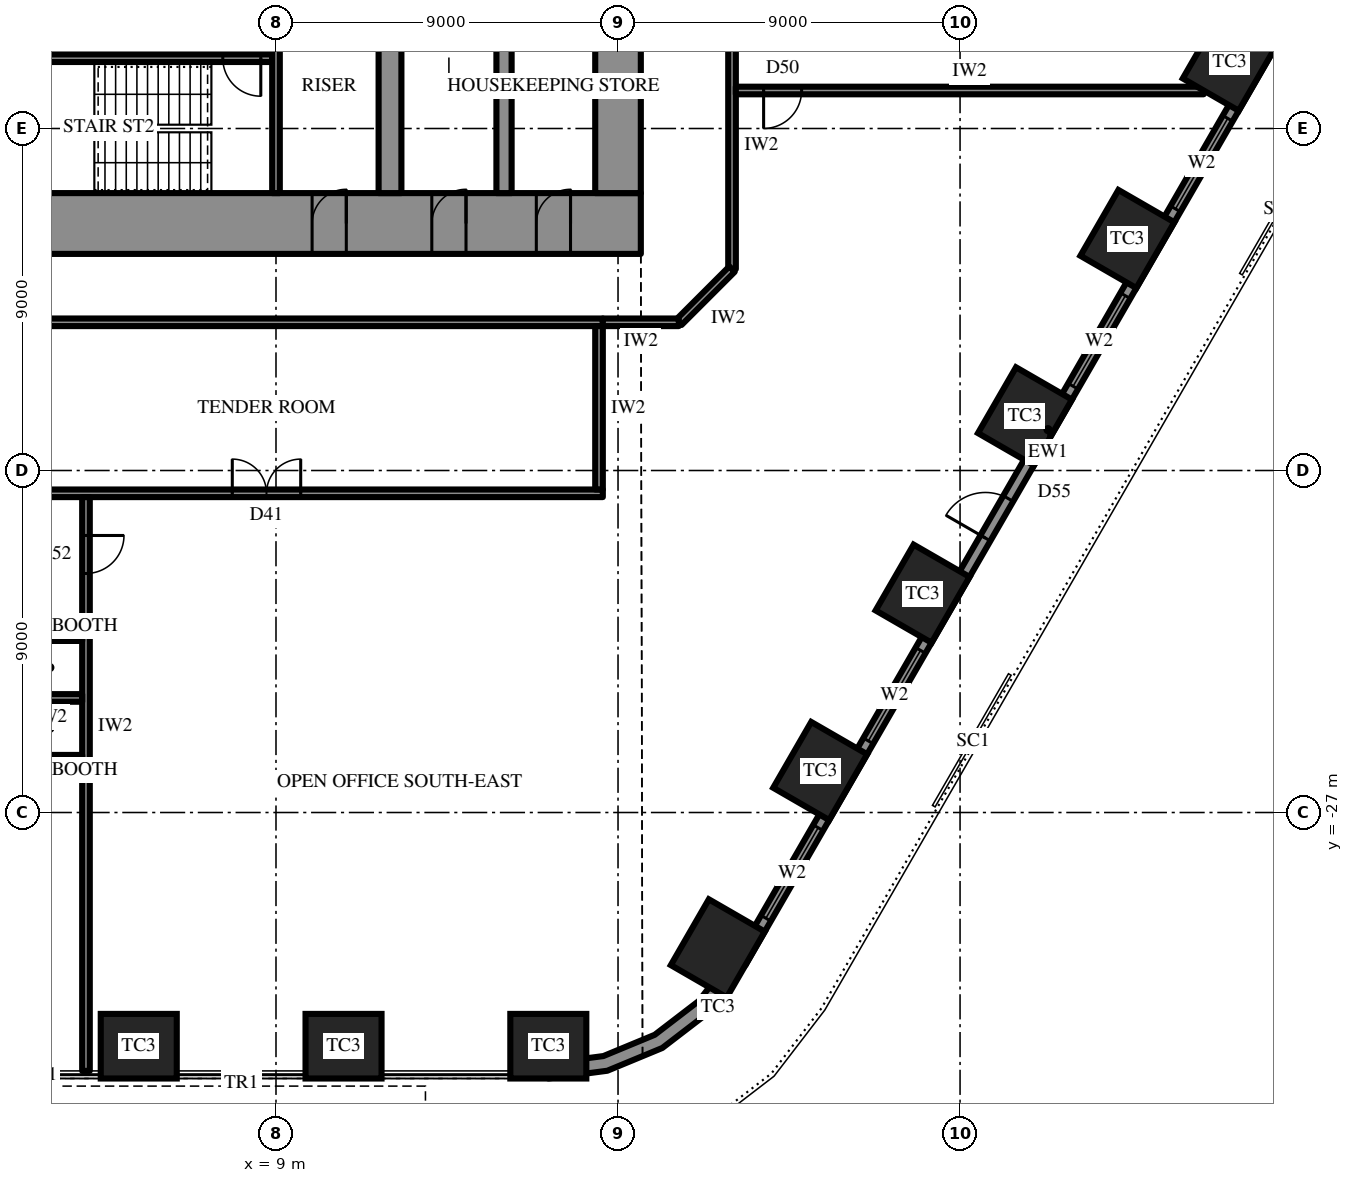
"""IFC4 building model, lengths in metres.
Left out: names, types, materials, properties, quantities, classifications, styles, units other than length and angle.
Written with IfcOpenShell. Run it as: python <this file> out.ifc"""

import sys

from ifc_helpers import new_model, si_unit, direction, frame, frame_2d, origin, origin_2d, place, context, subcontext, project, spatial, polyline, rectangle, outline, extrude, element, fill, save


model = new_model("IFC4")
c1 = context("Model", 3, precision=1e-05, world=origin(), true_north=direction((0.0, 1.0)))
c2 = subcontext(c1, "Body", "Model", "MODEL_VIEW")
j1 = project(units=[si_unit("LENGTHUNIT", "METRE"), si_unit("PLANEANGLEUNIT", "RADIAN")], contexts=[c1])
p1 = place(None, origin())
s1 = spatial("IfcSite", under=j1, at=p1, CompositionType="ELEMENT")
p2 = place(p1, origin())
s2 = spatial("IfcBuilding", under=s1, at=p2, CompositionType="ELEMENT")
p3 = place(p2, frame((0.0, 0.0, 65.5)))
s3 = spatial("IfcBuildingStorey", under=s2, at=p3, CompositionType="ELEMENT", Elevation=65.5)
for number, where, z_axis, x_axis in (
    (1, (5.389, -33.15, 0.0), (0.0, 0.0, 1.0), (1.0, 0.0, 0.0)),
    (2, (10.777, -33.15, 0.0), (0.0, 0.0, 1.0), (1.0, 0.0, 0.0)),
    (3, (16.166, -33.15, 0.0), (0.0, 0.0, 1.0), (1.0, 0.0, 0.0)),
    (4, (20.626, -30.575, 0.0), (0.0, 0.0, 1.0), (0.5, 0.866, 0.0)),
    (5, (23.32, -25.908, 0.0), (0.0, 0.0, 1.0), (0.5, 0.866, 0.0)),
    (6, (26.014, -21.242, 0.0), (0.0, 0.0, 1.0), (0.5, 0.866, 0.0)),
    (7, (28.709, -16.575, 0.0), (0.0, 0.0, 1.0), (0.5, 0.866, 0.0)),
    (8, (31.403, -11.908, 0.0), (0.0, 0.0, 1.0), (0.5, 0.866, 0.0)),
    (9, (34.097, -7.242, 0.0), (0.0, 0.0, 1.0), (0.5, 0.866, 0.0)),
):
    element("IfcColumn", number, at=place(p3, frame(where, z_axis=z_axis, x_axis=x_axis)), inside=s3, PredefinedType="COLUMN", context=c2, shape_type="SweptSolid", body=[
        extrude(rectangle(XDim=2.0, YDim=1.7, at=origin_2d()), origin(), (0.0, 0.0, 1.0), 4.2),
    ])
p4 = place(p3, frame((18.6, -11.5, 0.0), z_axis=(0.0, 0.0, 1.0), x_axis=(-1.0, 0.0, 0.0)))
e10 = element("IfcWall", 10, at=p4, inside=s3, PredefinedType="SHEAR", context=c2, shape_type="SweptSolid", body=[
    extrude(rectangle(XDim=37.2, YDim=1.6, at=frame_2d((18.6, 0.0))), origin(), (0.0, 0.0, 1.0), 4.2),
])
p5 = place(p4, frame((19.45, 0.0, 0.0)))
e11 = element("IfcOpeningElement", 11, at=p5, cuts=e10, PredefinedType="OPENING", context=c2, shape_type="SweptSolid", body=[
    extrude(rectangle(XDim=0.9, YDim=2.2, at=frame_2d((0.45, 1.1))), frame((0.0, 0.81, 0.0), z_axis=(0.0, -1.0, 0.0), x_axis=(1.0, 0.0, 0.0)), (0.0, 0.0, 1.0), 1.62),
])
p6 = place(p4, frame((22.45, 0.0, 0.0)))
e12 = element("IfcOpeningElement", 12, at=p6, cuts=e10, PredefinedType="OPENING", context=c2, shape_type="SweptSolid", body=[
    extrude(rectangle(XDim=0.9, YDim=2.2, at=frame_2d((0.45, 1.1))), frame((0.0, 0.81, 0.0), z_axis=(0.0, -1.0, 0.0), x_axis=(1.0, 0.0, 0.0)), (0.0, 0.0, 1.0), 1.62),
])
p7 = place(p4, frame((25.5, 0.0, 0.0)))
e13 = element("IfcOpeningElement", 13, at=p7, cuts=e10, PredefinedType="OPENING", context=c2, shape_type="SweptSolid", body=[
    extrude(rectangle(XDim=1.0, YDim=2.2, at=frame_2d((0.5, 1.1))), frame((0.0, 0.81, 0.0), z_axis=(0.0, -1.0, 0.0), x_axis=(1.0, 0.0, 0.0)), (0.0, 0.0, 1.0), 1.62),
])
p8 = place(p4, frame((1.85, 0.0, 0.0)))
e14 = element("IfcOpeningElement", 14, at=p8, cuts=e10, PredefinedType="OPENING", context=c2, shape_type="SweptSolid", body=[
    extrude(rectangle(XDim=0.9, YDim=2.2, at=frame_2d((0.45, 1.1))), frame((0.0, 0.81, 0.0), z_axis=(0.0, -1.0, 0.0), x_axis=(1.0, 0.0, 0.0)), (0.0, 0.0, 1.0), 1.62),
])
p9 = place(p4, frame((4.6, 0.0, 0.0)))
e15 = element("IfcOpeningElement", 15, at=p9, cuts=e10, PredefinedType="OPENING", context=c2, shape_type="SweptSolid", body=[
    extrude(rectangle(XDim=0.9, YDim=2.2, at=frame_2d((0.45, 1.1))), frame((0.0, 0.81, 0.0), z_axis=(0.0, -1.0, 0.0), x_axis=(1.0, 0.0, 0.0)), (0.0, 0.0, 1.0), 1.62),
])
p10 = place(p4, frame((7.75, 0.0, 0.0)))
e16 = element("IfcOpeningElement", 16, at=p10, cuts=e10, PredefinedType="OPENING", context=c2, shape_type="SweptSolid", body=[
    extrude(rectangle(XDim=0.9, YDim=2.2, at=frame_2d((0.45, 1.1))), frame((0.0, 0.81, 0.0), z_axis=(0.0, -1.0, 0.0), x_axis=(1.0, 0.0, 0.0)), (0.0, 0.0, 1.0), 1.62),
])
p11 = place(p4, frame((28.55, 0.0, 0.0)))
e17 = element("IfcOpeningElement", 17, at=p11, cuts=e10, PredefinedType="OPENING", context=c2, shape_type="SweptSolid", body=[
    extrude(rectangle(XDim=0.9, YDim=2.2, at=frame_2d((0.45, 1.1))), frame((0.0, 0.81, 0.0), z_axis=(0.0, -1.0, 0.0), x_axis=(1.0, 0.0, 0.0)), (0.0, 0.0, 1.0), 1.62),
])
p12 = place(p4, frame((31.7, 0.0, 0.0)))
e18 = element("IfcOpeningElement", 18, at=p12, cuts=e10, PredefinedType="OPENING", context=c2, shape_type="SweptSolid", body=[
    extrude(rectangle(XDim=0.9, YDim=2.2, at=frame_2d((0.45, 1.1))), frame((0.0, 0.81, 0.0), z_axis=(0.0, -1.0, 0.0), x_axis=(1.0, 0.0, 0.0)), (0.0, 0.0, 1.0), 1.62),
])
p13 = place(p4, frame((34.45, 0.0, 0.0)))
e19 = element("IfcOpeningElement", 19, at=p13, cuts=e10, PredefinedType="OPENING", context=c2, shape_type="SweptSolid", body=[
    extrude(rectangle(XDim=0.9, YDim=2.2, at=frame_2d((0.45, 1.1))), frame((0.0, 0.81, 0.0), z_axis=(0.0, -1.0, 0.0), x_axis=(1.0, 0.0, 0.0)), (0.0, 0.0, 1.0), 1.62),
])
p14 = place(p3, frame((18.0, -10.7, 0.0), z_axis=(0.0, 0.0, 1.0), x_axis=(0.0, 1.0, 0.0)))
e20 = element("IfcWall", 20, at=p14, inside=s3, PredefinedType="SHEAR", context=c2, shape_type="SweptSolid", body=[
    extrude(rectangle(XDim=21.4, YDim=1.2, at=frame_2d((10.7, 0.0))), origin(), (0.0, 0.0, 1.0), 4.2),
])
p15 = place(p14, frame((9.8, 0.0, 0.0)))
e21 = element("IfcOpeningElement", 21, at=p15, cuts=e20, PredefinedType="OPENING", context=c2, shape_type="SweptSolid", body=[
    extrude(rectangle(XDim=1.8, YDim=2.4, at=frame_2d((0.9, 1.2))), frame((0.0, 0.61, 0.0), z_axis=(0.0, -1.0, 0.0), x_axis=(1.0, 0.0, 0.0)), (0.0, 0.0, 1.0), 1.22),
])
p16 = place(p3, frame((12.0, -10.7, 0.0), z_axis=(0.0, 0.0, 1.0), x_axis=(0.0, 1.0, 0.0)))
e22 = element("IfcWall", 22, at=p16, inside=s3, PredefinedType="SHEAR", context=c2, shape_type="SweptSolid", body=[
    extrude(rectangle(XDim=21.4, YDim=0.6, at=frame_2d((10.7, 0.0))), origin(), (0.0, 0.0, 1.0), 4.2),
])
p17 = place(p16, frame((9.8, 0.0, 0.0)))
e23 = element("IfcOpeningElement", 23, at=p17, cuts=e22, PredefinedType="OPENING", context=c2, shape_type="SweptSolid", body=[
    extrude(rectangle(XDim=1.8, YDim=2.4, at=frame_2d((0.9, 1.2))), frame((0.0, 0.31, 0.0), z_axis=(0.0, -1.0, 0.0), x_axis=(1.0, 0.0, 0.0)), (0.0, 0.0, 1.0), 0.62),
])
p18 = place(p3, frame((15.0, -10.7, 0.0), z_axis=(0.0, 0.0, 1.0), x_axis=(0.0, 1.0, 0.0)))
e24 = element("IfcWall", 24, at=p18, inside=s3, PredefinedType="SHEAR", context=c2, shape_type="SweptSolid", body=[
    extrude(rectangle(XDim=21.4, YDim=0.4, at=frame_2d((10.7, 0.0))), origin(), (0.0, 0.0, 1.0), 4.2),
])
p19 = place(p18, frame((9.8, 0.0, 0.0)))
e25 = element("IfcOpeningElement", 25, at=p19, cuts=e24, PredefinedType="OPENING", context=c2, shape_type="SweptSolid", body=[
    extrude(rectangle(XDim=1.8, YDim=2.4, at=frame_2d((0.9, 1.2))), frame((0.0, 0.21, 0.0), z_axis=(0.0, -1.0, 0.0), x_axis=(1.0, 0.0, 0.0)), (0.0, 0.0, 1.0), 0.42),
])
p20 = place(p3, frame((8.9, -7.15, 0.0), z_axis=(0.0, 0.0, 1.0), x_axis=(-1.0, 0.0, 0.0)))
e26 = element("IfcWall", 26, at=p20, inside=s3, PredefinedType="SHEAR", context=c2, shape_type="SweptSolid", body=[
    extrude(rectangle(XDim=8.6, YDim=0.2, at=frame_2d((4.3, 0.0))), origin(), (0.0, 0.0, 1.0), 4.2),
])
p21 = place(p20, frame((0.3, 0.0, 0.0)))
e27 = element("IfcOpeningElement", 27, at=p21, cuts=e26, PredefinedType="OPENING", context=c2, shape_type="SweptSolid", body=[
    extrude(rectangle(XDim=1.0, YDim=2.2, at=frame_2d((0.5, 1.1))), frame((0.0, 0.11, 0.0), z_axis=(0.0, -1.0, 0.0), x_axis=(1.0, 0.0, 0.0)), (0.0, 0.0, 1.0), 0.22),
])
p22 = place(p3, origin())
e28 = element("IfcWall", 28, at=p22, inside=s3, PredefinedType="SOLIDWALL", context=c2, shape_type="SweptSolid", body=[
    extrude(outline(polyline([(16.166, -34.0), (17.719, -33.796), (19.166, -33.196), (20.408, -32.243), (21.362, -31.0), (21.016, -30.8), (20.125, -31.96), (18.966, -32.85), (17.615, -33.409), (16.166, -33.6), (16.166, -34.0)])), origin(), (0.0, 0.0, 1.0), 2.7),
])
p23 = place(p3, frame((21.232, -30.925, 0.0), z_axis=(0.0, 0.0, 1.0), x_axis=(0.499999163675, 0.866025886636, 0.0)))
e29 = element("IfcWall", 29, at=p23, inside=s3, PredefinedType="SOLIDWALL", context=c2, shape_type="SweptSolid", body=[
    extrude(rectangle(XDim=32.332, YDim=0.3, at=frame_2d((16.166, 0.0))), origin(), (0.0, 0.0, 1.0), 2.7),
])
p24 = place(p23, frame((1.319, 0.0, 0.6)))
e30 = element("IfcOpeningElement", 30, at=p24, cuts=e29, PredefinedType="OPENING", context=c2, shape_type="SweptSolid", body=[
    extrude(rectangle(XDim=2.75, YDim=1.85, at=frame_2d((1.375, 0.925))), frame((0.0, 0.16, 0.0), z_axis=(0.0, -1.0, 0.0), x_axis=(1.0, 0.0, 0.0)), (0.0, 0.0, 1.0), 0.32),
])
p25 = place(p23, frame((6.708, 0.0, 0.6)))
e31 = element("IfcOpeningElement", 31, at=p25, cuts=e29, PredefinedType="OPENING", context=c2, shape_type="SweptSolid", body=[
    extrude(rectangle(XDim=2.75, YDim=1.85, at=frame_2d((1.375, 0.925))), frame((0.0, 0.16, 0.0), z_axis=(0.0, -1.0, 0.0), x_axis=(1.0, 0.0, 0.0)), (0.0, 0.0, 1.0), 0.32),
])
p26 = place(p23, frame((12.872, 0.0, 0.0)))
e32 = element("IfcOpeningElement", 32, at=p26, cuts=e29, PredefinedType="OPENING", context=c2, shape_type="SweptSolid", body=[
    extrude(rectangle(XDim=1.2, YDim=2.4, at=frame_2d((0.6, 1.2))), frame((0.0, 0.16, 0.0), z_axis=(0.0, -1.0, 0.0), x_axis=(1.0, 0.0, 0.0)), (0.0, 0.0, 1.0), 0.32),
])
p27 = place(p23, frame((17.485, 0.0, 0.6)))
e33 = element("IfcOpeningElement", 33, at=p27, cuts=e29, PredefinedType="OPENING", context=c2, shape_type="SweptSolid", body=[
    extrude(rectangle(XDim=2.75, YDim=1.85, at=frame_2d((1.375, 0.925))), frame((0.0, 0.16, 0.0), z_axis=(0.0, -1.0, 0.0), x_axis=(1.0, 0.0, 0.0)), (0.0, 0.0, 1.0), 0.32),
])
p28 = place(p23, frame((22.874, 0.0, 0.6)))
e34 = element("IfcOpeningElement", 34, at=p28, cuts=e29, PredefinedType="OPENING", context=c2, shape_type="SweptSolid", body=[
    extrude(rectangle(XDim=2.75, YDim=1.85, at=frame_2d((1.375, 0.925))), frame((0.0, 0.16, 0.0), z_axis=(0.0, -1.0, 0.0), x_axis=(1.0, 0.0, 0.0)), (0.0, 0.0, 1.0), 0.32),
])
p29 = place(p23, frame((28.262, 0.0, 0.6)))
e35 = element("IfcOpeningElement", 35, at=p29, cuts=e29, PredefinedType="OPENING", context=c2, shape_type="SweptSolid", body=[
    extrude(rectangle(XDim=2.75, YDim=1.85, at=frame_2d((1.375, 0.925))), frame((0.0, 0.16, 0.0), z_axis=(0.0, -1.0, 0.0), x_axis=(1.0, 0.0, 0.0)), (0.0, 0.0, 1.0), 0.32),
])
p30 = place(p3, frame((9.0, -5.05, 0.0), z_axis=(0.0, 0.0, 1.0), x_axis=(0.0, -1.0, 0.0)))
e36 = element("IfcWall", 36, at=p30, inside=s3, PredefinedType="PARTITIONING", context=c2, shape_type="SweptSolid", body=[
    extrude(rectangle(XDim=5.65, YDim=0.2, at=frame_2d((2.825, 0.0))), origin(), (0.0, 0.0, 1.0), 4.0),
])
p31 = place(p3, frame((17.6, -14.1, 0.0), z_axis=(0.0, 0.0, 1.0), x_axis=(-1.0, 0.0, 0.0)))
e37 = element("IfcWall", 37, at=p31, inside=s3, PredefinedType="PARTITIONING", context=c2, shape_type="SweptSolid", body=[
    extrude(rectangle(XDim=35.2, YDim=0.2, at=frame_2d((17.6, 0.0))), origin(), (0.0, 0.0, 1.0), 4.0),
])
p32 = place(p3, frame((17.6, -18.6, 0.0), z_axis=(0.0, 0.0, 1.0), x_axis=(-1.0, 0.0, 0.0)))
e38 = element("IfcWall", 38, at=p32, inside=s3, PredefinedType="PARTITIONING", context=c2, shape_type="SweptSolid", body=[
    extrude(rectangle(XDim=35.2, YDim=0.2, at=frame_2d((17.6, 0.0))), origin(), (0.0, 0.0, 1.0), 4.0),
])
p33 = place(p32, frame((7.95, 0.0, 0.0)))
e39 = element("IfcOpeningElement", 39, at=p33, cuts=e38, PredefinedType="OPENING", context=c2, shape_type="SweptSolid", body=[
    extrude(rectangle(XDim=1.8, YDim=2.4, at=frame_2d((0.9, 1.2))), frame((0.0, 0.11, 0.0), z_axis=(0.0, -1.0, 0.0), x_axis=(1.0, 0.0, 0.0)), (0.0, 0.0, 1.0), 0.22),
])
p34 = place(p32, frame((25.45, 0.0, 0.0)))
e40 = element("IfcOpeningElement", 40, at=p34, cuts=e38, PredefinedType="OPENING", context=c2, shape_type="SweptSolid", body=[
    extrude(rectangle(XDim=1.8, YDim=2.4, at=frame_2d((0.9, 1.2))), frame((0.0, 0.11, 0.0), z_axis=(0.0, -1.0, 0.0), x_axis=(1.0, 0.0, 0.0)), (0.0, 0.0, 1.0), 0.22),
])
p35 = place(p3, frame((17.5, -14.2, 0.0), z_axis=(0.0, 0.0, 1.0), x_axis=(0.0, -1.0, 0.0)))
e41 = element("IfcWall", 41, at=p35, inside=s3, PredefinedType="PARTITIONING", context=c2, shape_type="SweptSolid", body=[
    extrude(rectangle(XDim=4.3, YDim=0.2, at=frame_2d((2.15, 0.0))), origin(), (0.0, 0.0, 1.0), 4.0),
])
p36 = place(p3, frame((21.0, -6.201, 0.0), z_axis=(0.0, 0.0, 1.0), x_axis=(0.0, -1.0, 0.0)))
e42 = element("IfcWall", 42, at=p36, inside=s3, PredefinedType="PARTITIONING", context=c2, shape_type="SweptSolid", body=[
    extrude(rectangle(XDim=6.499, YDim=0.2, at=frame_2d((3.25, 0.0))), origin(), (0.0, 0.0, 1.0), 4.0),
])
p37 = place(p3, frame((21.0, -12.7, 0.0), z_axis=(0.0, 0.0, 1.0), x_axis=(-0.707045124756, -0.707168432242, 0.0)))
e43 = element("IfcWall", 43, at=p37, inside=s3, PredefinedType="PARTITIONING", context=c2, shape_type="SweptSolid", body=[
    extrude(rectangle(XDim=1.98, YDim=0.2, at=frame_2d((0.99, 0.0))), origin(), (0.0, 0.0, 1.0), 4.0),
])
p38 = place(p3, frame((19.6, -14.1, 0.0), z_axis=(0.0, 0.0, 1.0), x_axis=(-1.0, 0.0, 0.0)))
e44 = element("IfcWall", 44, at=p38, inside=s3, PredefinedType="PARTITIONING", context=c2, shape_type="SweptSolid", body=[
    extrude(rectangle(XDim=2.0, YDim=0.2, at=frame_2d((1.0, 0.0))), origin(), (0.0, 0.0, 1.0), 4.0),
])
p39 = place(p3, frame((4.0, -18.7, 0.0), z_axis=(0.0, 0.0, 1.0), x_axis=(0.0, -1.0, 0.0)))
e45 = element("IfcWall", 45, at=p39, inside=s3, PredefinedType="PARTITIONING", context=c2, shape_type="SweptSolid", body=[
    extrude(rectangle(XDim=15.1, YDim=0.2, at=frame_2d((7.55, 0.0))), origin(), (0.0, 0.0, 1.0), 4.0),
])
p40 = place(p39, frame((1.01, 0.0, 0.0)))
e46 = element("IfcOpeningElement", 46, at=p40, cuts=e45, PredefinedType="OPENING", context=c2, shape_type="SweptSolid", body=[
    extrude(rectangle(XDim=1.0, YDim=2.2, at=frame_2d((0.5, 1.1))), frame((0.0, 0.11, 0.0), z_axis=(0.0, -1.0, 0.0), x_axis=(1.0, 0.0, 0.0)), (0.0, 0.0, 1.0), 0.22),
])
p41 = place(p3, frame((21.1, -8.0, 0.0), z_axis=(0.0, 0.0, 1.0), x_axis=(1.0, 0.0, 0.0)))
e47 = element("IfcWall", 47, at=p41, inside=s3, PredefinedType="PARTITIONING", context=c2, shape_type="SweptSolid", body=[
    extrude(rectangle(XDim=12.311, YDim=0.2, at=frame_2d((6.155, 0.0))), origin(), (0.0, 0.0, 1.0), 4.0),
])
p42 = place(p41, frame((0.731, 0.0, 0.0)))
e48 = element("IfcOpeningElement", 48, at=p42, cuts=e47, PredefinedType="OPENING", context=c2, shape_type="SweptSolid", body=[
    extrude(rectangle(XDim=1.0, YDim=2.2, at=frame_2d((0.5, 1.1))), frame((0.0, 0.11, 0.0), z_axis=(0.0, -1.0, 0.0), x_axis=(1.0, 0.0, 0.0)), (0.0, 0.0, 1.0), 0.22),
])
for number, where, z_axis, x_axis in (
    (49, (3.9, -22.385, 0.0), (0.0, 0.0, 1.0), (-1.0, 0.0, 0.0)),
    (50, (3.9, -23.985, 0.0), (0.0, 0.0, 1.0), (-1.0, 0.0, 0.0)),
    (51, (3.9, -25.585, 0.0), (0.0, 0.0, 1.0), (-1.0, 0.0, 0.0)),
):
    element("IfcWall", number, at=place(p3, frame(where, z_axis=z_axis, x_axis=x_axis)), inside=s3, PredefinedType="PARTITIONING", context=c2, shape_type="SweptSolid", body=[
        extrude(rectangle(XDim=1.7, YDim=0.2, at=frame_2d((0.85, 0.0))), origin(), (0.0, 0.0, 1.0), 4.0),
    ])
p43 = place(p24, origin())
e52 = element("IfcWindow", 52, at=p43, inside=s3, PartitioningType="SINGLE_PANEL", PredefinedType="WINDOW", context=c2, shape_type="SweptSolid", body=[
    extrude(rectangle(XDim=2.75, YDim=1.85, at=frame_2d((1.375, 0.925))), frame((0.0, 0.03, 0.0), z_axis=(0.0, -1.0, 0.0), x_axis=(1.0, 0.0, 0.0)), (0.0, 0.0, 1.0), 0.06),
])
fill(e30, e52)
p44 = place(p25, origin())
e53 = element("IfcWindow", 53, at=p44, inside=s3, PartitioningType="SINGLE_PANEL", PredefinedType="WINDOW", context=c2, shape_type="SweptSolid", body=[
    extrude(rectangle(XDim=2.75, YDim=1.85, at=frame_2d((1.375, 0.925))), frame((0.0, 0.03, 0.0), z_axis=(0.0, -1.0, 0.0), x_axis=(1.0, 0.0, 0.0)), (0.0, 0.0, 1.0), 0.06),
])
fill(e31, e53)
p45 = place(p26, origin())
e54 = element("IfcDoor", 54, at=p45, inside=s3, OperationType="SINGLE_SWING_RIGHT", PredefinedType="DOOR", context=c2, shape_type="SweptSolid", body=[
    extrude(rectangle(XDim=1.2, YDim=2.4, at=frame_2d((0.6, 1.2))), frame((0.0, 0.025, 0.0), z_axis=(0.0, -1.0, 0.0), x_axis=(1.0, 0.0, 0.0)), (0.0, 0.0, 1.0), 0.05),
])
fill(e32, e54)
p46 = place(p27, origin())
e55 = element("IfcWindow", 55, at=p46, inside=s3, PartitioningType="SINGLE_PANEL", PredefinedType="WINDOW", context=c2, shape_type="SweptSolid", body=[
    extrude(rectangle(XDim=2.75, YDim=1.85, at=frame_2d((1.375, 0.925))), frame((0.0, 0.03, 0.0), z_axis=(0.0, -1.0, 0.0), x_axis=(1.0, 0.0, 0.0)), (0.0, 0.0, 1.0), 0.06),
])
fill(e33, e55)
p47 = place(p28, origin())
e56 = element("IfcWindow", 56, at=p47, inside=s3, PartitioningType="SINGLE_PANEL", PredefinedType="WINDOW", context=c2, shape_type="SweptSolid", body=[
    extrude(rectangle(XDim=2.75, YDim=1.85, at=frame_2d((1.375, 0.925))), frame((0.0, 0.03, 0.0), z_axis=(0.0, -1.0, 0.0), x_axis=(1.0, 0.0, 0.0)), (0.0, 0.0, 1.0), 0.06),
])
fill(e34, e56)
p48 = place(p21, origin())
e57 = element("IfcDoor", 57, at=p48, inside=s3, OperationType="SINGLE_SWING_RIGHT", PredefinedType="DOOR", context=c2, shape_type="SweptSolid", body=[
    extrude(rectangle(XDim=1.0, YDim=2.2, at=frame_2d((0.5, 1.1))), frame((0.0, 0.025, 0.0), z_axis=(0.0, -1.0, 0.0), x_axis=(1.0, 0.0, 0.0)), (0.0, 0.0, 1.0), 0.05),
])
fill(e27, e57)
p49 = place(p8, frame((0.9, 0.0, 0.0), z_axis=(0.0, 0.0, 1.0), x_axis=(-1.0, 0.0, 0.0)))
e58 = element("IfcDoor", 58, at=p49, inside=s3, OperationType="SINGLE_SWING_LEFT", PredefinedType="DOOR", context=c2, shape_type="SweptSolid", body=[
    extrude(rectangle(XDim=0.9, YDim=2.2, at=frame_2d((0.45, 1.1))), frame((0.0, 0.025, 0.0), z_axis=(0.0, -1.0, 0.0), x_axis=(1.0, 0.0, 0.0)), (0.0, 0.0, 1.0), 0.05),
])
fill(e14, e58)
p50 = place(p9, frame((0.9, 0.0, 0.0), z_axis=(0.0, 0.0, 1.0), x_axis=(-1.0, 0.0, 0.0)))
e59 = element("IfcDoor", 59, at=p50, inside=s3, OperationType="SINGLE_SWING_LEFT", PredefinedType="DOOR", context=c2, shape_type="SweptSolid", body=[
    extrude(rectangle(XDim=0.9, YDim=2.2, at=frame_2d((0.45, 1.1))), frame((0.0, 0.025, 0.0), z_axis=(0.0, -1.0, 0.0), x_axis=(1.0, 0.0, 0.0)), (0.0, 0.0, 1.0), 0.05),
])
fill(e15, e59)
p51 = place(p10, frame((0.9, 0.0, 0.0), z_axis=(0.0, 0.0, 1.0), x_axis=(-1.0, 0.0, 0.0)))
e60 = element("IfcDoor", 60, at=p51, inside=s3, OperationType="SINGLE_SWING_LEFT", PredefinedType="DOOR", context=c2, shape_type="SweptSolid", body=[
    extrude(rectangle(XDim=0.9, YDim=2.2, at=frame_2d((0.45, 1.1))), frame((0.0, 0.025, 0.0), z_axis=(0.0, -1.0, 0.0), x_axis=(1.0, 0.0, 0.0)), (0.0, 0.0, 1.0), 0.05),
])
fill(e16, e60)
p52 = place(p33, frame((1.8, 0.0, 0.0), z_axis=(0.0, 0.0, 1.0), x_axis=(-1.0, 0.0, 0.0)))
e61 = element("IfcDoor", 61, at=p52, inside=s3, OperationType="DOUBLE_DOOR_SINGLE_SWING", PredefinedType="DOOR", context=c2, shape_type="SweptSolid", body=[
    extrude(rectangle(XDim=1.8, YDim=2.4, at=frame_2d((0.9, 1.2))), frame((0.0, 0.025, 0.0), z_axis=(0.0, -1.0, 0.0), x_axis=(1.0, 0.0, 0.0)), (0.0, 0.0, 1.0), 0.05),
])
fill(e39, e61)
p53 = place(p40, origin())
e62 = element("IfcDoor", 62, at=p53, inside=s3, OperationType="SINGLE_SWING_RIGHT", PredefinedType="DOOR", context=c2, shape_type="SweptSolid", body=[
    extrude(rectangle(XDim=1.0, YDim=2.2, at=frame_2d((0.5, 1.1))), frame((0.0, 0.025, 0.0), z_axis=(0.0, -1.0, 0.0), x_axis=(1.0, 0.0, 0.0)), (0.0, 0.0, 1.0), 0.05),
])
fill(e46, e62)
p54 = place(p42, frame((1.0, 0.0, 0.0), z_axis=(0.0, 0.0, 1.0), x_axis=(-1.0, 0.0, 0.0)))
e63 = element("IfcDoor", 63, at=p54, inside=s3, OperationType="SINGLE_SWING_LEFT", PredefinedType="DOOR", context=c2, shape_type="SweptSolid", body=[
    extrude(rectangle(XDim=1.0, YDim=2.2, at=frame_2d((0.5, 1.1))), frame((0.0, 0.025, 0.0), z_axis=(0.0, -1.0, 0.0), x_axis=(1.0, 0.0, 0.0)), (0.0, 0.0, 1.0), 0.05),
])
fill(e48, e63)
save(model, sys.argv[1])
